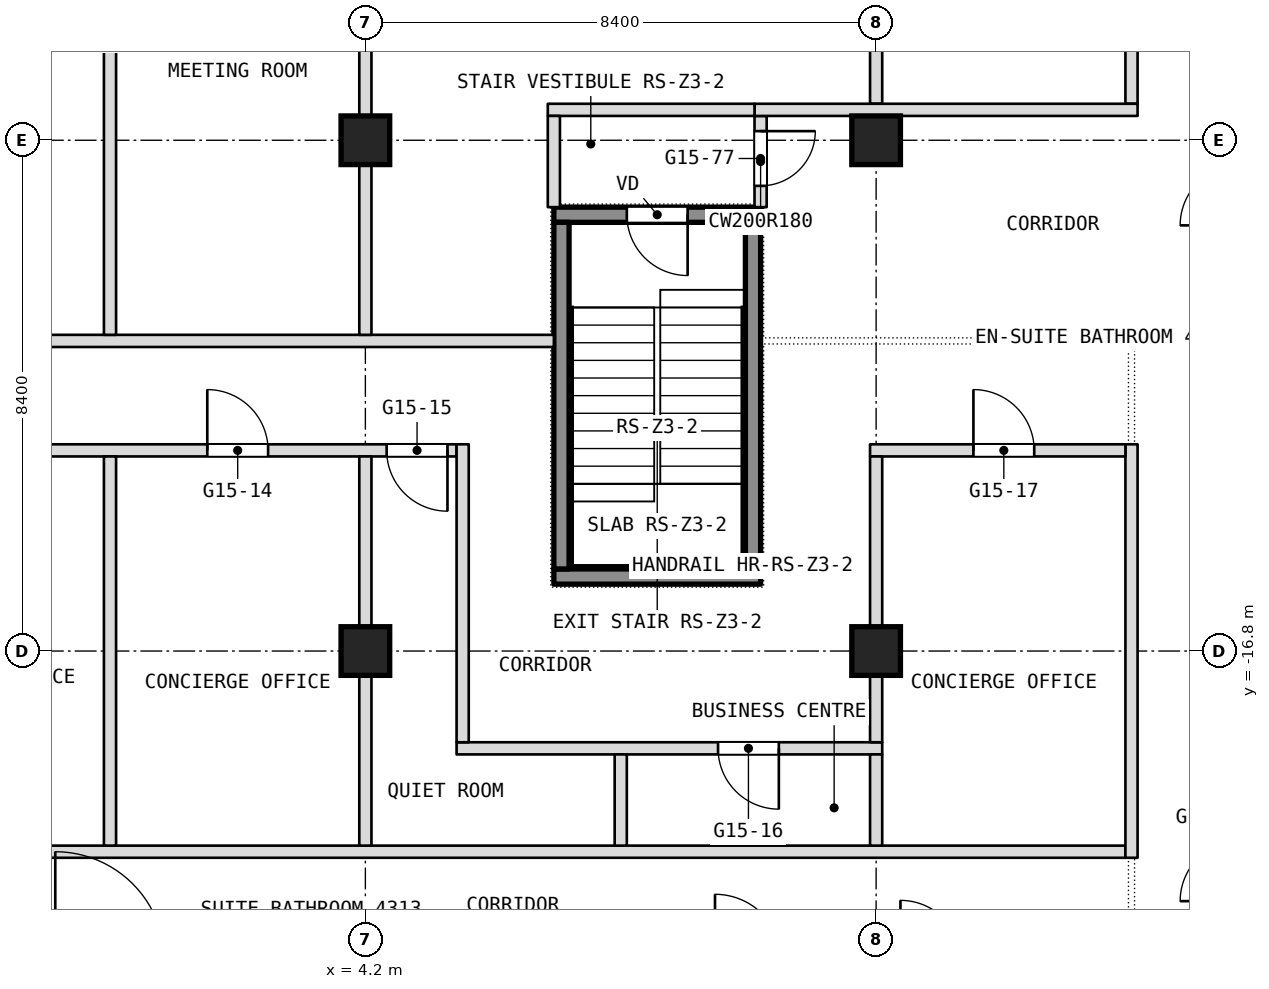
"""IFC4 building model, lengths in metres.
Left out: names, types, materials, properties, quantities, classifications, styles, units other than length and angle.
Written with IfcOpenShell. Run it as: python <this file> out.ifc"""

import sys

from ifc_helpers import new_model, si_unit, direction, frame, frame_2d, origin, origin_2d, place, context, subcontext, project, spatial, rectangle, extrude, element, fill, save


model = new_model("IFC4")
c1 = context("Model", 3, precision=1e-05, world=origin(), true_north=direction((0.0, 1.0)))
c2 = subcontext(c1, "Body", "Model", "MODEL_VIEW")
j1 = project(units=[si_unit("LENGTHUNIT", "METRE"), si_unit("PLANEANGLEUNIT", "RADIAN")], contexts=[c1])
p1 = place(None, origin())
s1 = spatial("IfcSite", under=j1, at=p1, CompositionType="ELEMENT")
p2 = place(p1, origin())
s2 = spatial("IfcBuilding", under=s1, at=p2, CompositionType="ELEMENT")
p3 = place(p2, frame((0.0, 0.0, 191.3)))
s3 = spatial("IfcBuildingStorey", under=s2, at=p3, CompositionType="ELEMENT", Elevation=191.3)
for number, where, z_axis, x_axis in (
    (1, (4.2, -16.8, 0.0), (0.0, 0.0, 1.0), (1.0, 0.0, 0.0)),
    (2, (4.2, -8.4, 0.0), (0.0, 0.0, 1.0), (1.0, 0.0, 0.0)),
    (3, (12.6, -16.8, 0.0), (0.0, 0.0, 1.0), (1.0, 0.0, 0.0)),
    (4, (12.6, -8.4, 0.0), (0.0, 0.0, 1.0), (1.0, 0.0, 0.0)),
):
    element("IfcColumn", number, at=place(p3, frame(where, z_axis=z_axis, x_axis=x_axis)), inside=s3, PredefinedType="COLUMN", context=c2, shape_type="SweptSolid", body=[
        extrude(rectangle(XDim=0.8, YDim=0.8, at=origin_2d()), origin(), (0.0, 0.0, 1.0), 3.6),
    ])
p4 = place(p3, frame((-16.7, -20.1, 0.0), z_axis=(0.0, 0.0, 1.0), x_axis=(1.0, 0.0, 0.0)))
e5 = element("IfcWall", 5, at=p4, inside=s3, PredefinedType="PARTITIONING", context=c2, shape_type="SweptSolid", body=[
    extrude(rectangle(XDim=33.4, YDim=0.2, at=frame_2d((16.7, 0.0))), origin(), (0.0, 0.0, 1.0), 3.34),
])
p5 = place(p3, frame((5.7, -18.4, 0.0), z_axis=(0.0, 0.0, 1.0), x_axis=(1.0, 0.0, 0.0)))
e6 = element("IfcWall", 6, at=p5, inside=s3, PredefinedType="PARTITIONING", context=c2, shape_type="SweptSolid", body=[
    extrude(rectangle(XDim=7.0, YDim=0.2, at=frame_2d((3.5, 0.0))), origin(), (0.0, 0.0, 1.0), 3.34),
])
p6 = place(p5, frame((4.3, 0.0, 0.0)))
e7 = element("IfcOpeningElement", 7, at=p6, cuts=e6, PredefinedType="OPENING", context=c2, shape_type="SweptSolid", body=[
    extrude(rectangle(XDim=1.0, YDim=2.1, at=frame_2d((0.5, 1.05))), frame((0.0, 0.1, 0.0), z_axis=(0.0, -1.0, 0.0), x_axis=(1.0, 0.0, 0.0)), (0.0, 0.0, 1.0), 0.2),
])
p7 = place(p3, frame((16.8, -20.2, 0.0), z_axis=(0.0, 0.0, 1.0), x_axis=(0.0, 1.0, 0.0)))
e8 = element("IfcWall", 8, at=p7, inside=s3, PredefinedType="PARTITIONING", context=c2, shape_type="SweptSolid", body=[
    extrude(rectangle(XDim=6.8, YDim=0.2, at=frame_2d((3.4, 0.0))), origin(), (0.0, 0.0, 1.0), 3.34),
])
p8 = place(p3, frame((16.8, -7.8, 0.0), z_axis=(0.0, 0.0, 1.0), x_axis=(0.0, 1.0, 0.0)))
e9 = element("IfcWall", 9, at=p8, inside=s3, PredefinedType="PARTITIONING", context=c2, shape_type="SweptSolid", body=[
    extrude(rectangle(XDim=5.9, YDim=0.2, at=frame_2d((2.95, 0.0))), origin(), (0.0, 0.0, 1.0), 3.34),
])
p9 = place(p3, frame((-5.9, -13.5, 0.0), z_axis=(0.0, 0.0, 1.0), x_axis=(1.0, 0.0, 0.0)))
e10 = element("IfcWall", 10, at=p9, inside=s3, PredefinedType="PARTITIONING", context=c2, shape_type="SweptSolid", body=[
    extrude(rectangle(XDim=11.6, YDim=0.2, at=frame_2d((5.8, 0.0))), origin(), (0.0, 0.0, 1.0), 3.34),
])
p10 = place(p9, frame((3.3, 0.0, 0.0)))
e11 = element("IfcOpeningElement", 11, at=p10, cuts=e10, PredefinedType="OPENING", context=c2, shape_type="SweptSolid", body=[
    extrude(rectangle(XDim=1.0, YDim=2.1, at=frame_2d((0.5, 1.05))), frame((0.0, 0.1, 0.0), z_axis=(0.0, -1.0, 0.0), x_axis=(1.0, 0.0, 0.0)), (0.0, 0.0, 1.0), 0.2),
])
p11 = place(p9, frame((7.5, 0.0, 0.0)))
e12 = element("IfcOpeningElement", 12, at=p11, cuts=e10, PredefinedType="OPENING", context=c2, shape_type="SweptSolid", body=[
    extrude(rectangle(XDim=1.0, YDim=2.1, at=frame_2d((0.5, 1.05))), frame((0.0, 0.1, 0.0), z_axis=(0.0, -1.0, 0.0), x_axis=(1.0, 0.0, 0.0)), (0.0, 0.0, 1.0), 0.2),
])
p12 = place(p9, frame((10.45, 0.0, 0.0)))
e13 = element("IfcOpeningElement", 13, at=p12, cuts=e10, PredefinedType="OPENING", context=c2, shape_type="SweptSolid", body=[
    extrude(rectangle(XDim=1.0, YDim=2.1, at=frame_2d((0.5, 1.05))), frame((0.0, 0.1, 0.0), z_axis=(0.0, -1.0, 0.0), x_axis=(1.0, 0.0, 0.0)), (0.0, 0.0, 1.0), 0.2),
])
p13 = place(p3, frame((12.5, -13.5, 0.0), z_axis=(0.0, 0.0, 1.0), x_axis=(1.0, 0.0, 0.0)))
e14 = element("IfcWall", 14, at=p13, inside=s3, PredefinedType="PARTITIONING", context=c2, shape_type="SweptSolid", body=[
    extrude(rectangle(XDim=4.2, YDim=0.2, at=frame_2d((2.1, 0.0))), origin(), (0.0, 0.0, 1.0), 3.34),
])
p14 = place(p13, frame((1.7, 0.0, 0.0)))
e15 = element("IfcOpeningElement", 15, at=p14, cuts=e14, PredefinedType="OPENING", context=c2, shape_type="SweptSolid", body=[
    extrude(rectangle(XDim=1.0, YDim=2.1, at=frame_2d((0.5, 1.05))), frame((0.0, 0.1, 0.0), z_axis=(0.0, -1.0, 0.0), x_axis=(1.0, 0.0, 0.0)), (0.0, 0.0, 1.0), 0.2),
])
p15 = place(p3, frame((12.6, -20.0, 0.0), z_axis=(0.0, 0.0, 1.0), x_axis=(0.0, 1.0, 0.0)))
e16 = element("IfcWall", 16, at=p15, inside=s3, PredefinedType="PARTITIONING", context=c2, shape_type="SweptSolid", body=[
    extrude(rectangle(XDim=1.5, YDim=0.2, at=frame_2d((0.75, 0.0))), origin(), (0.0, 0.0, 1.0), 3.34),
])
p16 = place(p3, frame((12.6, -7.8, 0.0), z_axis=(0.0, 0.0, 1.0), x_axis=(0.0, 1.0, 0.0)))
e17 = element("IfcWall", 17, at=p16, inside=s3, PredefinedType="PARTITIONING", context=c2, shape_type="SweptSolid", body=[
    extrude(rectangle(XDim=5.9, YDim=0.2, at=frame_2d((2.95, 0.0))), origin(), (0.0, 0.0, 1.0), 3.34),
])
p17 = place(p3, frame((12.6, -18.3, 0.0), z_axis=(0.0, 0.0, 1.0), x_axis=(0.0, 1.0, 0.0)))
e18 = element("IfcWall", 18, at=p17, inside=s3, PredefinedType="PARTITIONING", context=c2, shape_type="SweptSolid", body=[
    extrude(rectangle(XDim=4.7, YDim=0.2, at=frame_2d((2.35, 0.0))), origin(), (0.0, 0.0, 1.0), 3.34),
])
p18 = place(p3, frame((-7.3, -11.7, 0.0), z_axis=(0.0, 0.0, 1.0), x_axis=(1.0, 0.0, 0.0)))
e19 = element("IfcWall", 19, at=p18, inside=s3, PredefinedType="PARTITIONING", context=c2, shape_type="SweptSolid", body=[
    extrude(rectangle(XDim=14.6, YDim=0.2, at=frame_2d((7.3, 0.0))), origin(), (0.0, 0.0, 1.0), 3.34),
])
p19 = place(p3, frame((10.7, -9.5, 0.0), z_axis=(0.0, 0.0, 1.0), x_axis=(0.0, 1.0, 0.0)))
e20 = element("IfcWall", 20, at=p19, inside=s3, PredefinedType="PARTITIONING", context=c2, shape_type="SweptSolid", body=[
    extrude(rectangle(XDim=1.5, YDim=0.2, at=frame_2d((0.75, 0.0))), origin(), (0.0, 0.0, 1.0), 3.34),
])
p20 = place(p19, frame((0.35, 0.0, 0.0)))
e21 = element("IfcOpeningElement", 21, at=p20, cuts=e20, PredefinedType="OPENING", context=c2, shape_type="SweptSolid", body=[
    extrude(rectangle(XDim=0.9, YDim=2.1, at=frame_2d((0.45, 1.05))), frame((0.0, 0.1, 0.0), z_axis=(0.0, -1.0, 0.0), x_axis=(1.0, 0.0, 0.0)), (0.0, 0.0, 1.0), 0.2),
])
p21 = place(p3, frame((8.4, -20.0, 0.0), z_axis=(0.0, 0.0, 1.0), x_axis=(0.0, 1.0, 0.0)))
e22 = element("IfcWall", 22, at=p21, inside=s3, PredefinedType="PARTITIONING", context=c2, shape_type="SweptSolid", body=[
    extrude(rectangle(XDim=1.5, YDim=0.2, at=frame_2d((0.75, 0.0))), origin(), (0.0, 0.0, 1.0), 3.34),
])
p22 = place(p3, frame((10.6, -7.9, 0.0), z_axis=(0.0, 0.0, 1.0), x_axis=(1.0, 0.0, 0.0)))
e23 = element("IfcWall", 23, at=p22, inside=s3, PredefinedType="PARTITIONING", context=c2, shape_type="SweptSolid", body=[
    extrude(rectangle(XDim=6.3, YDim=0.2, at=frame_2d((3.15, 0.0))), origin(), (0.0, 0.0, 1.0), 3.34),
])
p23 = place(p3, frame((7.2, -7.9, 0.0), z_axis=(0.0, 0.0, 1.0), x_axis=(1.0, 0.0, 0.0)))
e24 = element("IfcWall", 24, at=p23, inside=s3, PredefinedType="PARTITIONING", context=c2, shape_type="SweptSolid", body=[
    extrude(rectangle(XDim=3.4, YDim=0.2, at=frame_2d((1.7, 0.0))), origin(), (0.0, 0.0, 1.0), 3.34),
])
p24 = place(p3, frame((7.3, -9.5, 0.0), z_axis=(0.0, 0.0, 1.0), x_axis=(0.0, 1.0, 0.0)))
e25 = element("IfcWall", 25, at=p24, inside=s3, PredefinedType="PARTITIONING", context=c2, shape_type="SweptSolid", body=[
    extrude(rectangle(XDim=1.5, YDim=0.2, at=frame_2d((0.75, 0.0))), origin(), (0.0, 0.0, 1.0), 3.34),
])
p25 = place(p3, frame((5.8, -18.3, 0.0), z_axis=(0.0, 0.0, 1.0), x_axis=(0.0, 1.0, 0.0)))
e26 = element("IfcWall", 26, at=p25, inside=s3, PredefinedType="PARTITIONING", context=c2, shape_type="SweptSolid", body=[
    extrude(rectangle(XDim=4.9, YDim=0.2, at=frame_2d((2.45, 0.0))), origin(), (0.0, 0.0, 1.0), 3.34),
])
p26 = place(p3, frame((4.2, -20.0, 0.0), z_axis=(0.0, 0.0, 1.0), x_axis=(0.0, 1.0, 0.0)))
e27 = element("IfcWall", 27, at=p26, inside=s3, PredefinedType="PARTITIONING", context=c2, shape_type="SweptSolid", body=[
    extrude(rectangle(XDim=6.4, YDim=0.2, at=frame_2d((3.2, 0.0))), origin(), (0.0, 0.0, 1.0), 3.34),
])
p27 = place(p3, frame((4.2, -11.6, 0.0), z_axis=(0.0, 0.0, 1.0), x_axis=(0.0, 1.0, 0.0)))
e28 = element("IfcWall", 28, at=p27, inside=s3, PredefinedType="PARTITIONING", context=c2, shape_type="SweptSolid", body=[
    extrude(rectangle(XDim=9.7, YDim=0.2, at=frame_2d((4.85, 0.0))), origin(), (0.0, 0.0, 1.0), 3.34),
])
p28 = place(p3, frame((0.0, -20.0, 0.0), z_axis=(0.0, 0.0, 1.0), x_axis=(0.0, 1.0, 0.0)))
e29 = element("IfcWall", 29, at=p28, inside=s3, PredefinedType="PARTITIONING", context=c2, shape_type="SweptSolid", body=[
    extrude(rectangle(XDim=6.4, YDim=0.2, at=frame_2d((3.2, 0.0))), origin(), (0.0, 0.0, 1.0), 3.34),
])
p29 = place(p3, frame((0.0, -11.6, 0.0), z_axis=(0.0, 0.0, 1.0), x_axis=(0.0, 1.0, 0.0)))
e30 = element("IfcWall", 30, at=p29, inside=s3, PredefinedType="PARTITIONING", context=c2, shape_type="SweptSolid", body=[
    extrude(rectangle(XDim=9.7, YDim=0.2, at=frame_2d((4.85, 0.0))), origin(), (0.0, 0.0, 1.0), 3.34),
])
p30 = place(p3, frame((7.3, -15.575, 0.1), z_axis=(0.0, 0.0, 1.0), x_axis=(1.0, 0.0, 0.0)))
e31 = element("IfcWall", 31, at=p30, inside=s3, PredefinedType="SHEAR", context=c2, shape_type="SweptSolid", body=[
    extrude(rectangle(XDim=3.4, YDim=0.25, at=frame_2d((1.7, 0.0))), origin(), (0.0, 0.0, 1.0), 3.6),
])
p31 = place(p3, frame((7.3, -9.625, 0.1), z_axis=(0.0, 0.0, 1.0), x_axis=(1.0, 0.0, 0.0)))
e32 = element("IfcWall", 32, at=p31, inside=s3, PredefinedType="SHEAR", context=c2, shape_type="SweptSolid", body=[
    extrude(rectangle(XDim=3.4, YDim=0.25, at=frame_2d((1.7, 0.0))), origin(), (0.0, 0.0, 1.0), 3.6),
])
p32 = place(p31, frame((1.2, 0.0, 0.0)))
e33 = element("IfcOpeningElement", 33, at=p32, cuts=e32, PredefinedType="OPENING", context=c2, shape_type="SweptSolid", body=[
    extrude(rectangle(XDim=1.0, YDim=2.1, at=frame_2d((0.5, 1.05))), frame((0.0, 0.125, 0.0), z_axis=(0.0, -1.0, 0.0), x_axis=(1.0, 0.0, 0.0)), (0.0, 0.0, 1.0), 0.25),
])
for number, where, z_axis, x_axis in (
    (34, (7.425, -15.45, 0.1), (0.0, 0.0, 1.0), (0.0, 1.0, 0.0)),
    (35, (10.575, -15.45, 0.1), (0.0, 0.0, 1.0), (0.0, 1.0, 0.0)),
):
    element("IfcWall", number, at=place(p3, frame(where, z_axis=z_axis, x_axis=x_axis)), inside=s3, PredefinedType="SHEAR", context=c2, shape_type="SweptSolid", body=[
        extrude(rectangle(XDim=5.7, YDim=0.25, at=frame_2d((2.85, 0.0))), origin(), (0.0, 0.0, 1.0), 3.6),
    ])
p33 = place(p6, origin())
e36 = element("IfcDoor", 36, at=p33, inside=s3, OperationType="SINGLE_SWING_LEFT", PredefinedType="DOOR", context=c2, shape_type="SweptSolid", body=[
    extrude(rectangle(XDim=1.0, YDim=2.1, at=frame_2d((0.5, 1.05))), frame((0.0, 0.025, 0.0), z_axis=(0.0, -1.0, 0.0), x_axis=(1.0, 0.0, 0.0)), (0.0, 0.0, 1.0), 0.05),
])
fill(e7, e36)
p34 = place(p11, origin())
e37 = element("IfcDoor", 37, at=p34, inside=s3, OperationType="SINGLE_SWING_RIGHT", PredefinedType="DOOR", context=c2, shape_type="SweptSolid", body=[
    extrude(rectangle(XDim=1.0, YDim=2.1, at=frame_2d((0.5, 1.05))), frame((0.0, 0.025, 0.0), z_axis=(0.0, -1.0, 0.0), x_axis=(1.0, 0.0, 0.0)), (0.0, 0.0, 1.0), 0.05),
])
fill(e12, e37)
p35 = place(p12, origin())
e38 = element("IfcDoor", 38, at=p35, inside=s3, OperationType="SINGLE_SWING_LEFT", PredefinedType="DOOR", context=c2, shape_type="SweptSolid", body=[
    extrude(rectangle(XDim=1.0, YDim=2.1, at=frame_2d((0.5, 1.05))), frame((0.0, 0.025, 0.0), z_axis=(0.0, -1.0, 0.0), x_axis=(1.0, 0.0, 0.0)), (0.0, 0.0, 1.0), 0.05),
])
fill(e13, e38)
p36 = place(p14, origin())
e39 = element("IfcDoor", 39, at=p36, inside=s3, OperationType="SINGLE_SWING_LEFT", PredefinedType="DOOR", context=c2, shape_type="SweptSolid", body=[
    extrude(rectangle(XDim=1.0, YDim=2.1, at=frame_2d((0.5, 1.05))), frame((0.0, 0.025, 0.0), z_axis=(0.0, -1.0, 0.0), x_axis=(1.0, 0.0, 0.0)), (0.0, 0.0, 1.0), 0.05),
])
fill(e15, e39)
p37 = place(p20, origin())
e40 = element("IfcDoor", 40, at=p37, inside=s3, OperationType="SINGLE_SWING_RIGHT", PredefinedType="DOOR", context=c2, shape_type="SweptSolid", body=[
    extrude(rectangle(XDim=0.9, YDim=2.1, at=frame_2d((0.45, 1.05))), frame((0.0, 0.025, 0.0), z_axis=(0.0, -1.0, 0.0), x_axis=(1.0, 0.0, 0.0)), (0.0, 0.0, 1.0), 0.05),
])
fill(e21, e40)
p38 = place(p32, origin())
e41 = element("IfcDoor", 41, at=p38, inside=s3, OperationType="SINGLE_SWING_LEFT", PredefinedType="DOOR", context=c2, shape_type="SweptSolid", body=[
    extrude(rectangle(XDim=1.0, YDim=2.1, at=frame_2d((0.5, 1.05))), frame((0.0, 0.025, 0.0), z_axis=(0.0, -1.0, 0.0), x_axis=(1.0, 0.0, 0.0)), (0.0, 0.0, 1.0), 0.05),
])
fill(e33, e41)
save(model, sys.argv[1])
